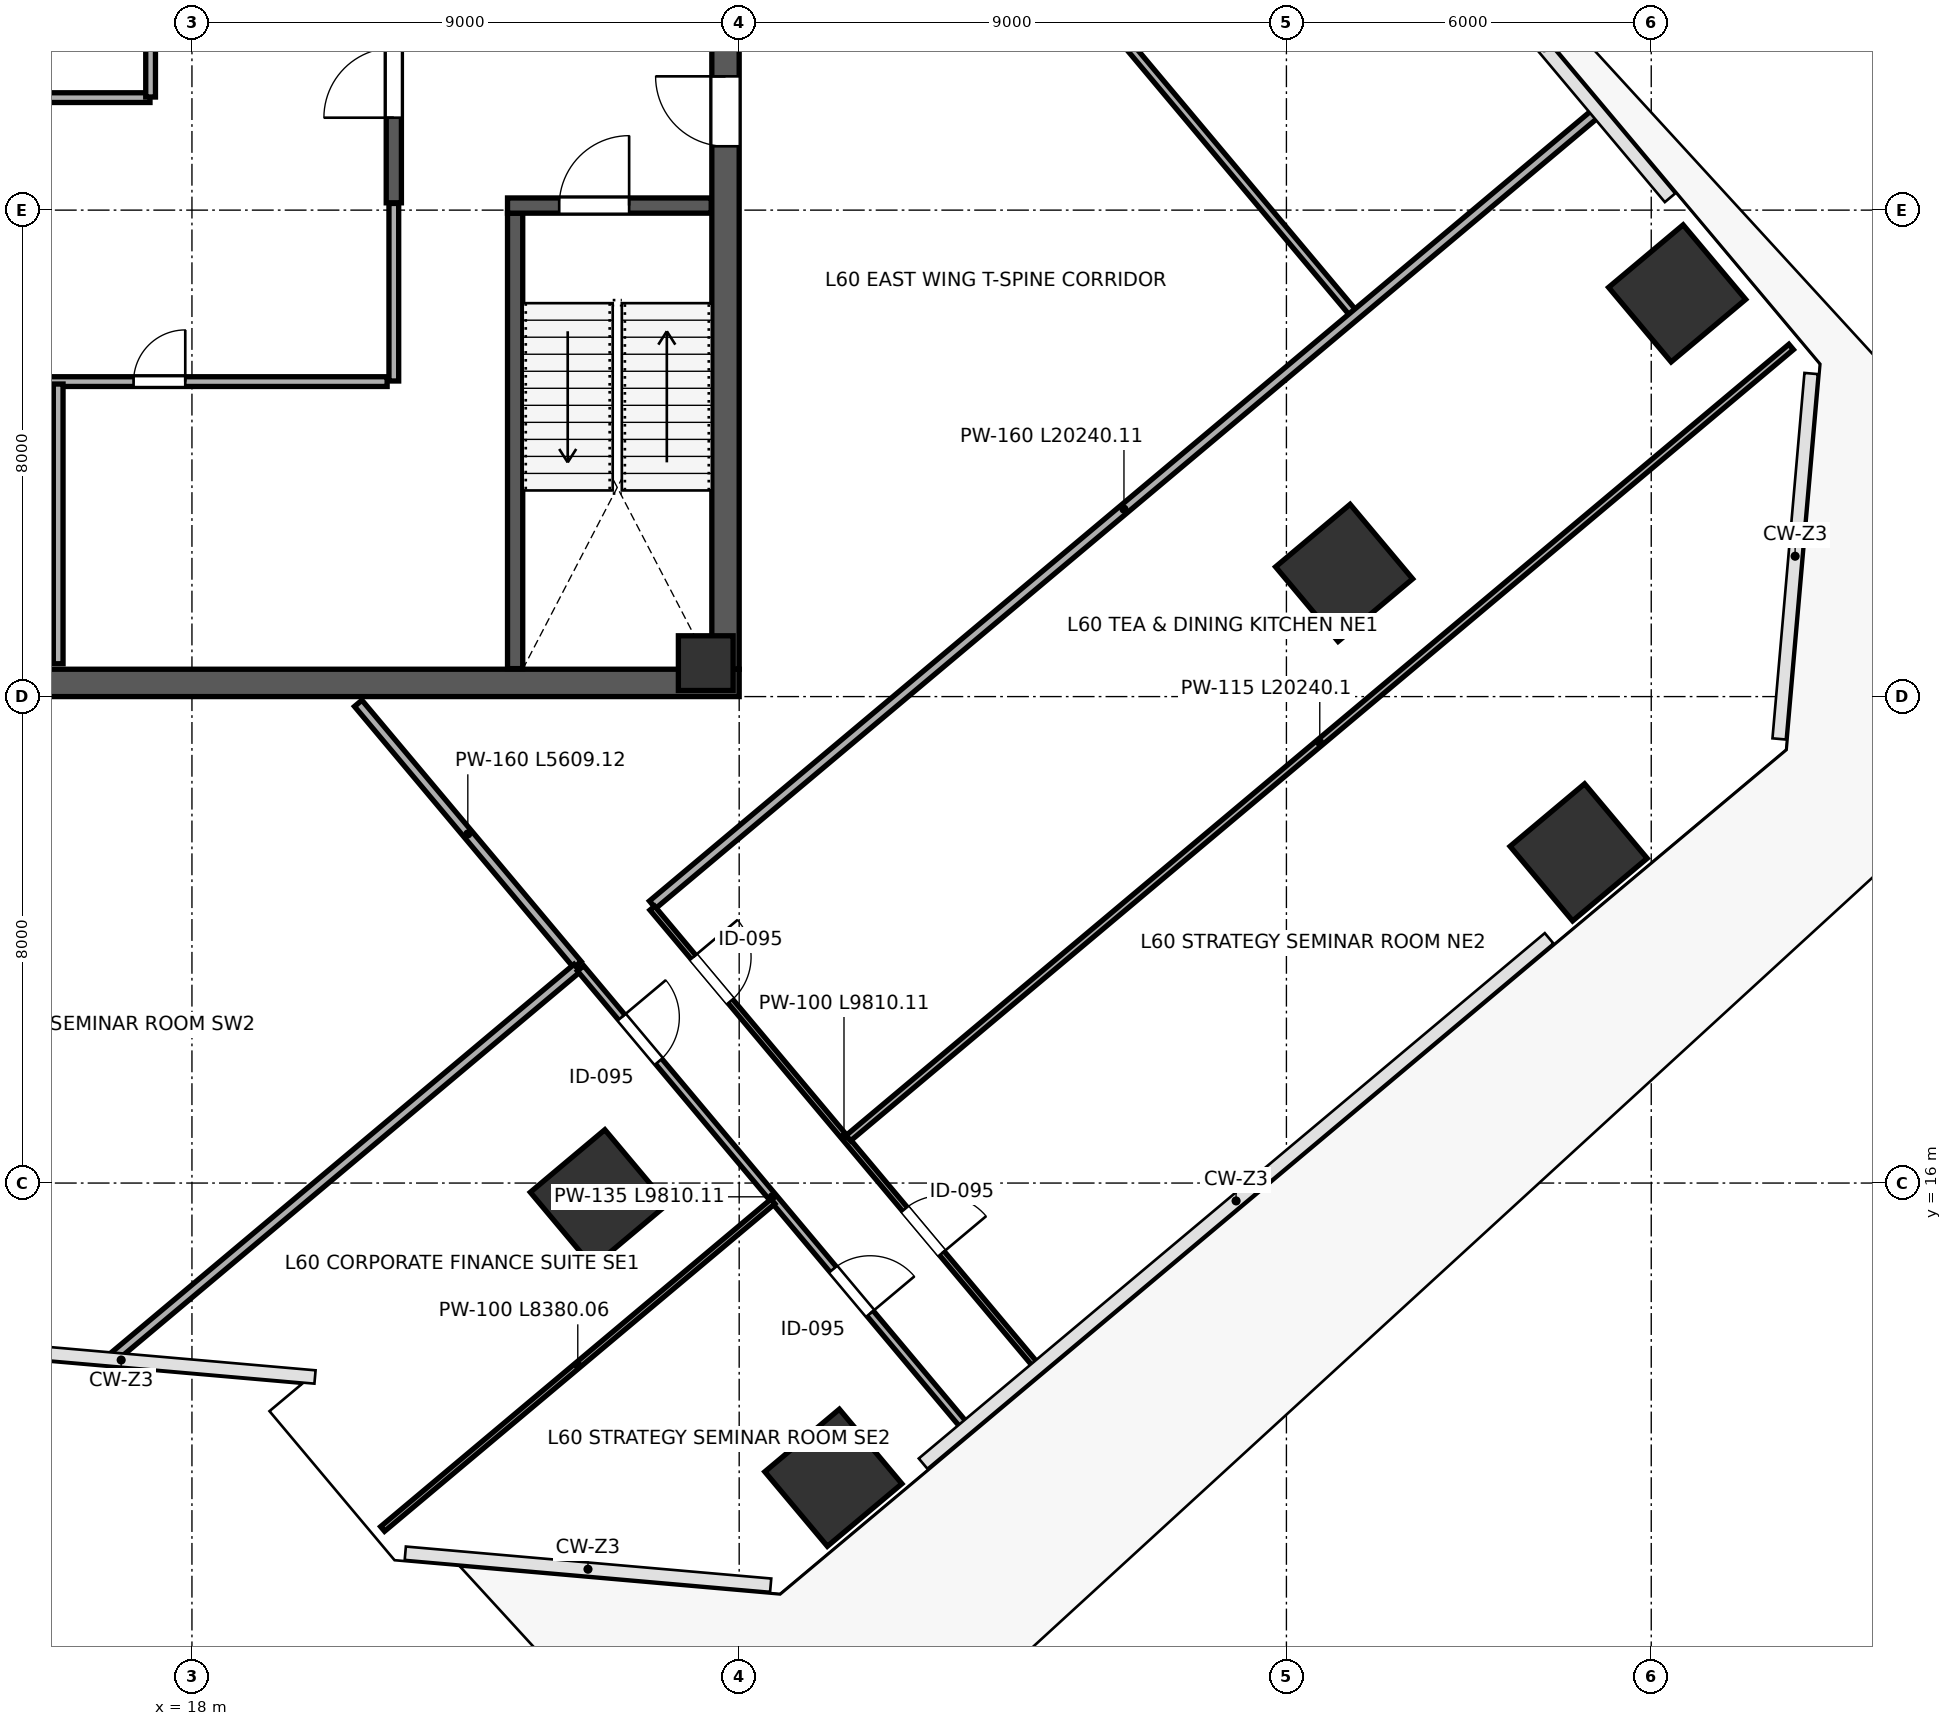
"""IFC4 building model, lengths in metres.
Left out: names, types, materials, properties, quantities, classifications, styles, units other than length and angle.
Written with IfcOpenShell. Run it as: python <this file> out.ifc"""

import sys

from ifc_helpers import new_model, si_unit, direction, frame, frame_2d, origin, origin_2d, place, context, subcontext, project, spatial, rectangle, extrude, source, transform, mapped, element, fill, save


model = new_model("IFC4")
c1 = context("Model", 3, precision=1e-05, world=origin(), true_north=direction((0.0, 1.0)))
c2 = subcontext(c1, "Body", "Model", "MODEL_VIEW")
j1 = project(units=[si_unit("LENGTHUNIT", "METRE"), si_unit("PLANEANGLEUNIT", "RADIAN")], contexts=[c1])
p1 = place(None, origin())
s1 = spatial("IfcSite", under=j1, at=p1, CompositionType="ELEMENT")
p2 = place(p1, origin())
s2 = spatial("IfcBuilding", under=s1, at=p2, CompositionType="ELEMENT")
p3 = place(p2, frame((0.0, 0.0, 266.8)))
s3 = spatial("IfcBuildingStorey", under=s2, at=p3, CompositionType="ELEMENT", Elevation=266.8)
m1 = source(origin(), c2, "Body", "SweptSolid", [
    extrude(rectangle(XDim=0.9, YDim=0.9, at=origin_2d()), origin(), (0.0, 0.0, 1.0), 4.198),
])
p4 = place(p3, frame((26.45, 24.55, 0.001), z_axis=(0.0, 0.0, 1.0), x_axis=(1.0, 0.0, 0.0)))
e1 = element("IfcColumn", 1, at=p4, inside=s3, PredefinedType="COLUMN", context=c2, shape_type="MappedRepresentation", body=[
    mapped(m1, transform((0.0, 0.0, 0.0), scale=1.0)),
])
m2 = source(origin(), c2, "Body", "SweptSolid", [
    extrude(rectangle(XDim=1.6, YDim=1.6, at=origin_2d()), origin(), (0.0, 0.0, 1.0), 4.198),
])
for number, where, z_axis, x_axis in (
    (2, (24.692, 15.75, 0.001), (0.0, 0.0, 1.0), (-0.643, 0.766, 0.0)),
    (3, (36.949, 26.035, 0.001), (0.0, 0.0, 1.0), (-0.643, 0.766, 0.0)),
):
    element("IfcColumn", number, at=place(p3, frame(where, z_axis=z_axis, x_axis=x_axis)), inside=s3, PredefinedType="COLUMN", context=c2, shape_type="MappedRepresentation", body=[
        mapped(m2, transform((0.0, 0.0, 0.0), scale=1.0)),
    ])
m3 = source(origin(), c2, "Body", "SweptSolid", [
    extrude(rectangle(XDim=1.6, YDim=1.6, at=origin_2d()), origin(), (0.0, 0.0, 1.0), 4.198),
])
for number, where, z_axis, x_axis in (
    (4, (42.426, 30.631, 0.001), (0.0, 0.0, 1.0), (-0.643, 0.766, 0.0)),
    (5, (28.549, 11.154, 0.001), (0.0, 0.0, 1.0), (-0.643, 0.766, 0.0)),
    (6, (40.805, 21.438, 0.001), (0.0, 0.0, 1.0), (-0.643, 0.766, 0.0)),
):
    element("IfcColumn", number, at=place(p3, frame(where, z_axis=z_axis, x_axis=x_axis)), inside=s3, PredefinedType="COLUMN", context=c2, shape_type="MappedRepresentation", body=[
        mapped(m3, transform((0.0, 0.0, 0.0), scale=1.0)),
    ])
p5 = place(p3, frame((26.775, 24.45, 0.0), z_axis=(0.0, 0.0, 1.0), x_axis=(0.0, 1.0, 0.0)))
e7 = element("IfcWall", 7, at=p5, inside=s3, PredefinedType="SHEAR", context=c2, shape_type="SweptSolid", body=[
    extrude(rectangle(XDim=15.1, YDim=0.45, at=frame_2d((7.55, 0.0))), origin(), (0.0, 0.0, 1.0), 3.96),
])
p6 = place(p5, frame((8.6, 0.0, 0.0)))
e8 = element("IfcOpeningElement", 8, at=p6, cuts=e7, PredefinedType="OPENING", context=c2, shape_type="SweptSolid", body=[
    extrude(rectangle(XDim=1.15, YDim=2.2, at=frame_2d((0.575, 1.1))), frame((0.0, 0.235, 0.0), z_axis=(0.0, -1.0, 0.0), x_axis=(1.0, 0.0, 0.0)), (0.0, 0.0, 1.0), 0.47),
])
p7 = place(p3, frame((9.0, 24.225, 0.0), z_axis=(0.0, 0.0, 1.0), x_axis=(1.0, 0.0, 0.0)))
e9 = element("IfcWall", 9, at=p7, inside=s3, PredefinedType="SHEAR", context=c2, shape_type="SweptSolid", body=[
    extrude(rectangle(XDim=18.0, YDim=0.45, at=frame_2d((9.0, 0.0))), origin(), (0.0, 0.0, 1.0), 3.96),
])
p8 = place(p3, frame((23.315, 24.46, 0.0), z_axis=(0.0, 0.0, 1.0), x_axis=(0.0, 1.0, 0.0)))
e10 = element("IfcWall", 10, at=p8, inside=s3, PredefinedType="SHEAR", context=c2, shape_type="SweptSolid", body=[
    extrude(rectangle(XDim=7.49, YDim=0.25, at=frame_2d((3.745, 0.0))), origin(), (0.0, 0.0, 1.0), 3.96),
])
p9 = place(p3, frame((23.19, 32.075, 0.0), z_axis=(0.0, 0.0, 1.0), x_axis=(1.0, 0.0, 0.0)))
e11 = element("IfcWall", 11, at=p9, inside=s3, PredefinedType="SHEAR", context=c2, shape_type="SweptSolid", body=[
    extrude(rectangle(XDim=3.35, YDim=0.25, at=frame_2d((1.675, 0.0))), origin(), (0.0, 0.0, 1.0), 3.96),
])
p10 = place(p9, frame((0.85, 0.0, 0.0)))
e12 = element("IfcOpeningElement", 12, at=p10, cuts=e11, PredefinedType="OPENING", context=c2, shape_type="SweptSolid", body=[
    extrude(rectangle(XDim=1.15, YDim=2.2, at=frame_2d((0.575, 1.1))), frame((0.0, 0.135, 0.0), z_axis=(0.0, -1.0, 0.0), x_axis=(1.0, 0.0, 0.0)), (0.0, 0.0, 1.0), 0.27),
])
p11 = place(p3, frame((21.32, 32.12, 0.0), z_axis=(0.0, 0.0, 1.0), x_axis=(0.0, 1.0, 0.0)))
e13 = element("IfcWall", 13, at=p11, inside=s3, PredefinedType="SHEAR", context=c2, shape_type="SweptSolid", body=[
    extrude(rectangle(XDim=7.42, YDim=0.25, at=frame_2d((3.71, 0.0))), origin(), (0.0, 0.0, 1.0), 3.96),
])
p12 = place(p11, frame((1.4, 0.0, 0.0)))
e14 = element("IfcOpeningElement", 14, at=p12, cuts=e13, PredefinedType="OPENING", context=c2, shape_type="SweptSolid", body=[
    extrude(rectangle(XDim=1.15, YDim=2.2, at=frame_2d((0.575, 1.1))), frame((0.0, 0.135, 0.0), z_axis=(0.0, -1.0, 0.0), x_axis=(1.0, 0.0, 0.0)), (0.0, 0.0, 1.0), 0.27),
])
p13 = place(p3, frame((13.21, 33.85, 0.0), z_axis=(0.0, 0.0, 1.0), x_axis=(1.0, 0.0, 0.0)))
e15 = element("IfcWall", 15, at=p13, inside=s3, PredefinedType="PARTITIONING", context=c2, shape_type="SweptSolid", body=[
    extrude(rectangle(XDim=4.1, YDim=0.16, at=frame_2d((2.05, 0.0))), origin(), (0.0, 0.0, 1.0), 3.96),
])
p14 = place(p13, frame((1.35, 0.0, 0.0)))
e16 = element("IfcOpeningElement", 16, at=p14, cuts=e15, PredefinedType="OPENING", context=c2, shape_type="SweptSolid", body=[
    extrude(rectangle(XDim=0.9, YDim=2.15, at=frame_2d((0.45, 1.075))), frame((0.0, 0.09, 0.0), z_axis=(0.0, -1.0, 0.0), x_axis=(1.0, 0.0, 0.0)), (0.0, 0.0, 1.0), 0.18),
])
p15 = place(p3, frame((17.32, 33.86, 0.0), z_axis=(0.0, 0.0, 1.0), x_axis=(0.0, 1.0, 0.0)))
e17 = element("IfcWall", 17, at=p15, inside=s3, PredefinedType="PARTITIONING", context=c2, shape_type="SweptSolid", body=[
    extrude(rectangle(XDim=1.93, YDim=0.16, at=frame_2d((0.965, 0.0))), origin(), (0.0, 0.0, 1.0), 3.96),
])
p16 = place(p3, frame((12.84, 29.18, 0.0), z_axis=(0.0, 0.0, 1.0), x_axis=(1.0, 0.0, 0.0)))
e18 = element("IfcWall", 18, at=p16, inside=s3, PredefinedType="PARTITIONING", context=c2, shape_type="SweptSolid", body=[
    extrude(rectangle(XDim=8.37, YDim=0.16, at=frame_2d((4.185, 0.0))), origin(), (0.0, 0.0, 1.0), 3.96),
])
p17 = place(p16, frame((0.95, 0.0, 0.0)))
e19 = element("IfcOpeningElement", 19, at=p17, cuts=e18, PredefinedType="OPENING", context=c2, shape_type="SweptSolid", body=[
    extrude(rectangle(XDim=0.85, YDim=2.1, at=frame_2d((0.425, 1.05))), frame((0.0, 0.09, 0.0), z_axis=(0.0, -1.0, 0.0), x_axis=(1.0, 0.0, 0.0)), (0.0, 0.0, 1.0), 0.18),
])
p18 = place(p16, frame((4.2, 0.0, 0.0)))
e20 = element("IfcOpeningElement", 20, at=p18, cuts=e18, PredefinedType="OPENING", context=c2, shape_type="SweptSolid", body=[
    extrude(rectangle(XDim=0.85, YDim=2.1, at=frame_2d((0.425, 1.05))), frame((0.0, 0.09, 0.0), z_axis=(0.0, -1.0, 0.0), x_axis=(1.0, 0.0, 0.0)), (0.0, 0.0, 1.0), 0.18),
])
p19 = place(p3, frame((15.8, 24.54, 0.0), z_axis=(0.0, 0.0, 1.0), x_axis=(0.0, 1.0, 0.0)))
e21 = element("IfcWall", 21, at=p19, inside=s3, PredefinedType="PARTITIONING", context=c2, shape_type="SweptSolid", body=[
    extrude(rectangle(XDim=4.6, YDim=0.16, at=frame_2d((2.3, 0.0))), origin(), (0.0, 0.0, 1.0), 3.96),
])
p20 = place(p3, frame((21.32, 29.19, 0.0), z_axis=(0.0, 0.0, 1.0), x_axis=(0.0, 1.0, 0.0)))
e22 = element("IfcWall", 22, at=p20, inside=s3, PredefinedType="PARTITIONING", context=c2, shape_type="SweptSolid", body=[
    extrude(rectangle(XDim=2.92, YDim=0.16, at=frame_2d((1.46, 0.0))), origin(), (0.0, 0.0, 1.0), 3.96),
])
p21 = place(p3, frame((20.734, 23.889, 0.0), z_axis=(0.0, 0.0, 1.0), x_axis=(0.642758145725, -0.766069165353, 0.0)))
e23 = element("IfcWall", 23, at=p21, inside=s3, PredefinedType="PARTITIONING", context=c2, shape_type="SweptSolid", body=[
    extrude(rectangle(XDim=5.609, YDim=0.16, at=frame_2d((2.804, 0.0))), origin(), (0.0, 0.0, 1.0), 3.96),
])
p22 = place(p3, frame((19.528, 51.245, 0.0), z_axis=(0.0, 0.0, 1.0), x_axis=(0.642782364439, -0.766048844374, 0.0)))
e24 = element("IfcWall", 24, at=p22, inside=s3, PredefinedType="PARTITIONING", context=c2, shape_type="SweptSolid", body=[
    extrude(rectangle(XDim=27.34, YDim=0.135, at=frame_2d((13.67, 0.0))), origin(), (0.0, 0.0, 1.0), 3.96),
])
p23 = place(p22, frame((10.8, 0.0, 0.0)))
e25 = element("IfcOpeningElement", 25, at=p23, cuts=e24, PredefinedType="OPENING", context=c2, shape_type="SweptSolid", body=[
    extrude(rectangle(XDim=0.95, YDim=2.15, at=frame_2d((0.475, 1.075))), frame((0.0, 0.078, 0.0), z_axis=(0.0, -1.0, 0.0), x_axis=(1.0, 0.0, 0.0)), (0.0, 0.0, 1.0), 0.155),
])
p24 = place(p3, frame((25.576, 20.577, 0.0), z_axis=(0.0, 0.0, 1.0), x_axis=(0.76604764673, 0.642783791752, 0.0)))
e26 = element("IfcWall", 26, at=p24, inside=s3, PredefinedType="PARTITIONING", context=c2, shape_type="SweptSolid", body=[
    extrude(rectangle(XDim=20.24, YDim=0.16, at=frame_2d((10.12, 0.0))), origin(), (0.0, 0.0, 1.0), 3.195),
])
p25 = place(p3, frame((16.711, 13.139, 0.0), z_axis=(0.0, 0.0, 1.0), x_axis=(0.766041122188, 0.642791567398, 0.0)))
e27 = element("IfcWall", 27, at=p25, inside=s3, PredefinedType="PARTITIONING", context=c2, shape_type="SweptSolid", body=[
    extrude(rectangle(XDim=9.952, YDim=0.16, at=frame_2d((4.976, 0.0))), origin(), (0.0, 0.0, 1.0), 3.96),
])
p26 = place(p3, frame((25.571, 20.521, 0.0), z_axis=(0.0, 0.0, 1.0), x_axis=(0.64278520229, -0.766046463158, 0.0)))
e28 = element("IfcWall", 28, at=p26, inside=s3, PredefinedType="PARTITIONING", context=c2, shape_type="SweptSolid", body=[
    extrude(rectangle(XDim=9.81, YDim=0.1, at=frame_2d((4.905, 0.0))), origin(), (0.0, 0.0, 1.0), 3.96),
])
p27 = place(p26, frame((1.05, 0.0, 0.0)))
e29 = element("IfcOpeningElement", 29, at=p27, cuts=e28, PredefinedType="OPENING", context=c2, shape_type="SweptSolid", body=[
    extrude(rectangle(XDim=0.95, YDim=2.15, at=frame_2d((0.475, 1.075))), frame((0.0, 0.06, 0.0), z_axis=(0.0, -1.0, 0.0), x_axis=(1.0, 0.0, 0.0)), (0.0, 0.0, 1.0), 0.12),
])
p28 = place(p26, frame((6.46, 0.0, 0.0)))
e30 = element("IfcOpeningElement", 30, at=p28, cuts=e28, PredefinedType="OPENING", context=c2, shape_type="SweptSolid", body=[
    extrude(rectangle(XDim=0.95, YDim=2.15, at=frame_2d((0.475, 1.075))), frame((0.0, 0.06, 0.0), z_axis=(0.0, -1.0, 0.0), x_axis=(1.0, 0.0, 0.0)), (0.0, 0.0, 1.0), 0.12),
])
p29 = place(p3, frame((24.391, 19.531, 0.0), z_axis=(0.0, 0.0, 1.0), x_axis=(0.642797456481, -0.76603618057, 0.0)))
e31 = element("IfcWall", 31, at=p29, inside=s3, PredefinedType="PARTITIONING", context=c2, shape_type="SweptSolid", body=[
    extrude(rectangle(XDim=9.81, YDim=0.135, at=frame_2d((4.905, 0.0))), origin(), (0.0, 0.0, 1.0), 3.96),
])
p30 = place(p29, frame((1.05, 0.0, 0.0)))
e32 = element("IfcOpeningElement", 32, at=p30, cuts=e31, PredefinedType="OPENING", context=c2, shape_type="SweptSolid", body=[
    extrude(rectangle(XDim=0.95, YDim=2.15, at=frame_2d((0.475, 1.075))), frame((0.0, 0.078, 0.0), z_axis=(0.0, -1.0, 0.0), x_axis=(1.0, 0.0, 0.0)), (0.0, 0.0, 1.0), 0.155),
])
p31 = place(p29, frame((6.46, 0.0, 0.0)))
e33 = element("IfcOpeningElement", 33, at=p31, cuts=e31, PredefinedType="OPENING", context=c2, shape_type="SweptSolid", body=[
    extrude(rectangle(XDim=0.95, YDim=2.15, at=frame_2d((0.475, 1.075))), frame((0.0, 0.078, 0.0), z_axis=(0.0, -1.0, 0.0), x_axis=(1.0, 0.0, 0.0)), (0.0, 0.0, 1.0), 0.155),
])
p32 = place(p3, frame((28.796, 16.74, 0.0), z_axis=(0.0, 0.0, 1.0), x_axis=(0.766036723368, 0.642796809616, 0.0)))
e34 = element("IfcWall", 34, at=p32, inside=s3, PredefinedType="PARTITIONING", context=c2, shape_type="SweptSolid", body=[
    extrude(rectangle(XDim=20.24, YDim=0.115, at=frame_2d((10.12, 0.0))), origin(), (0.0, 0.0, 1.0), 3.96),
])
p33 = place(p3, frame((21.136, 10.312, 0.0), z_axis=(0.0, 0.0, 1.0), x_axis=(0.766048541695, 0.642782725162, 0.0)))
e35 = element("IfcWall", 35, at=p33, inside=s3, PredefinedType="PARTITIONING", context=c2, shape_type="SweptSolid", body=[
    extrude(rectangle(XDim=8.38, YDim=0.1, at=frame_2d((4.19, 0.0))), origin(), (0.0, 0.0, 1.0), 3.96),
])
m4 = source(origin(), c2, "Body", "SweptSolid", [
    extrude(rectangle(XDim=1.15, YDim=2.2, at=frame_2d((0.575, 1.1))), frame((0.0, 0.025, 0.0), z_axis=(0.0, -1.0, 0.0), x_axis=(1.0, 0.0, 0.0)), (0.0, 0.0, 1.0), 0.05),
])
p34 = place(p12, origin())
e36 = element("IfcDoor", 36, at=p34, inside=s3, OperationType="SINGLE_SWING_LEFT", PredefinedType="DOOR", context=c2, shape_type="MappedRepresentation", body=[
    mapped(m4, transform((0.0, 0.0, 0.0), scale=1.0)),
])
fill(e14, e36)
m5 = source(origin(), c2, "Body", "SweptSolid", [
    extrude(rectangle(XDim=1.15, YDim=2.2, at=frame_2d((0.575, 1.1))), frame((0.0, 0.025, 0.0), z_axis=(0.0, -1.0, 0.0), x_axis=(1.0, 0.0, 0.0)), (0.0, 0.0, 1.0), 0.05),
])
p35 = place(p10, origin())
e37 = element("IfcDoor", 37, at=p35, inside=s3, OperationType="SINGLE_SWING_RIGHT", PredefinedType="DOOR", context=c2, shape_type="MappedRepresentation", body=[
    mapped(m5, transform((0.0, 0.0, 0.0), scale=1.0)),
])
fill(e12, e37)
p36 = place(p6, origin())
e38 = element("IfcDoor", 38, at=p36, inside=s3, OperationType="SINGLE_SWING_RIGHT", PredefinedType="DOOR", context=c2, shape_type="MappedRepresentation", body=[
    mapped(m4, transform((0.0, 0.0, 0.0), scale=1.0)),
])
fill(e8, e38)
m6 = source(origin(), c2, "Body", "SweptSolid", [
    extrude(rectangle(XDim=0.85, YDim=2.1, at=frame_2d((0.425, 1.05))), frame((0.0, 0.025, 0.0), z_axis=(0.0, -1.0, 0.0), x_axis=(1.0, 0.0, 0.0)), (0.0, 0.0, 1.0), 0.05),
])
p37 = place(p18, origin())
e39 = element("IfcDoor", 39, at=p37, inside=s3, OperationType="SINGLE_SWING_RIGHT", PredefinedType="DOOR", context=c2, shape_type="MappedRepresentation", body=[
    mapped(m6, transform((0.0, 0.0, 0.0), scale=1.0)),
])
fill(e20, e39)
m7 = source(origin(), c2, "Body", "SweptSolid", [
    extrude(rectangle(XDim=0.95, YDim=2.15, at=frame_2d((0.475, 1.075))), frame((0.0, 0.025, 0.0), z_axis=(0.0, -1.0, 0.0), x_axis=(1.0, 0.0, 0.0)), (0.0, 0.0, 1.0), 0.05),
])
p38 = place(p27, origin())
e40 = element("IfcDoor", 40, at=p38, inside=s3, OperationType="SINGLE_SWING_LEFT", PredefinedType="DOOR", context=c2, shape_type="MappedRepresentation", body=[
    mapped(m7, transform((0.0, 0.0, 0.0), scale=1.0)),
])
fill(e29, e40)
p39 = place(p28, origin())
e41 = element("IfcDoor", 41, at=p39, inside=s3, OperationType="SINGLE_SWING_RIGHT", PredefinedType="DOOR", context=c2, shape_type="MappedRepresentation", body=[
    mapped(m7, transform((0.0, 0.0, 0.0), scale=1.0)),
])
fill(e30, e41)
p40 = place(p30, origin())
e42 = element("IfcDoor", 42, at=p40, inside=s3, OperationType="SINGLE_SWING_LEFT", PredefinedType="DOOR", context=c2, shape_type="MappedRepresentation", body=[
    mapped(m7, transform((0.0, 0.0, 0.0), scale=1.0)),
])
fill(e32, e42)
p41 = place(p31, origin())
e43 = element("IfcDoor", 43, at=p41, inside=s3, OperationType="SINGLE_SWING_RIGHT", PredefinedType="DOOR", context=c2, shape_type="MappedRepresentation", body=[
    mapped(m7, transform((0.0, 0.0, 0.0), scale=1.0)),
])
fill(e33, e43)
save(model, sys.argv[1])
